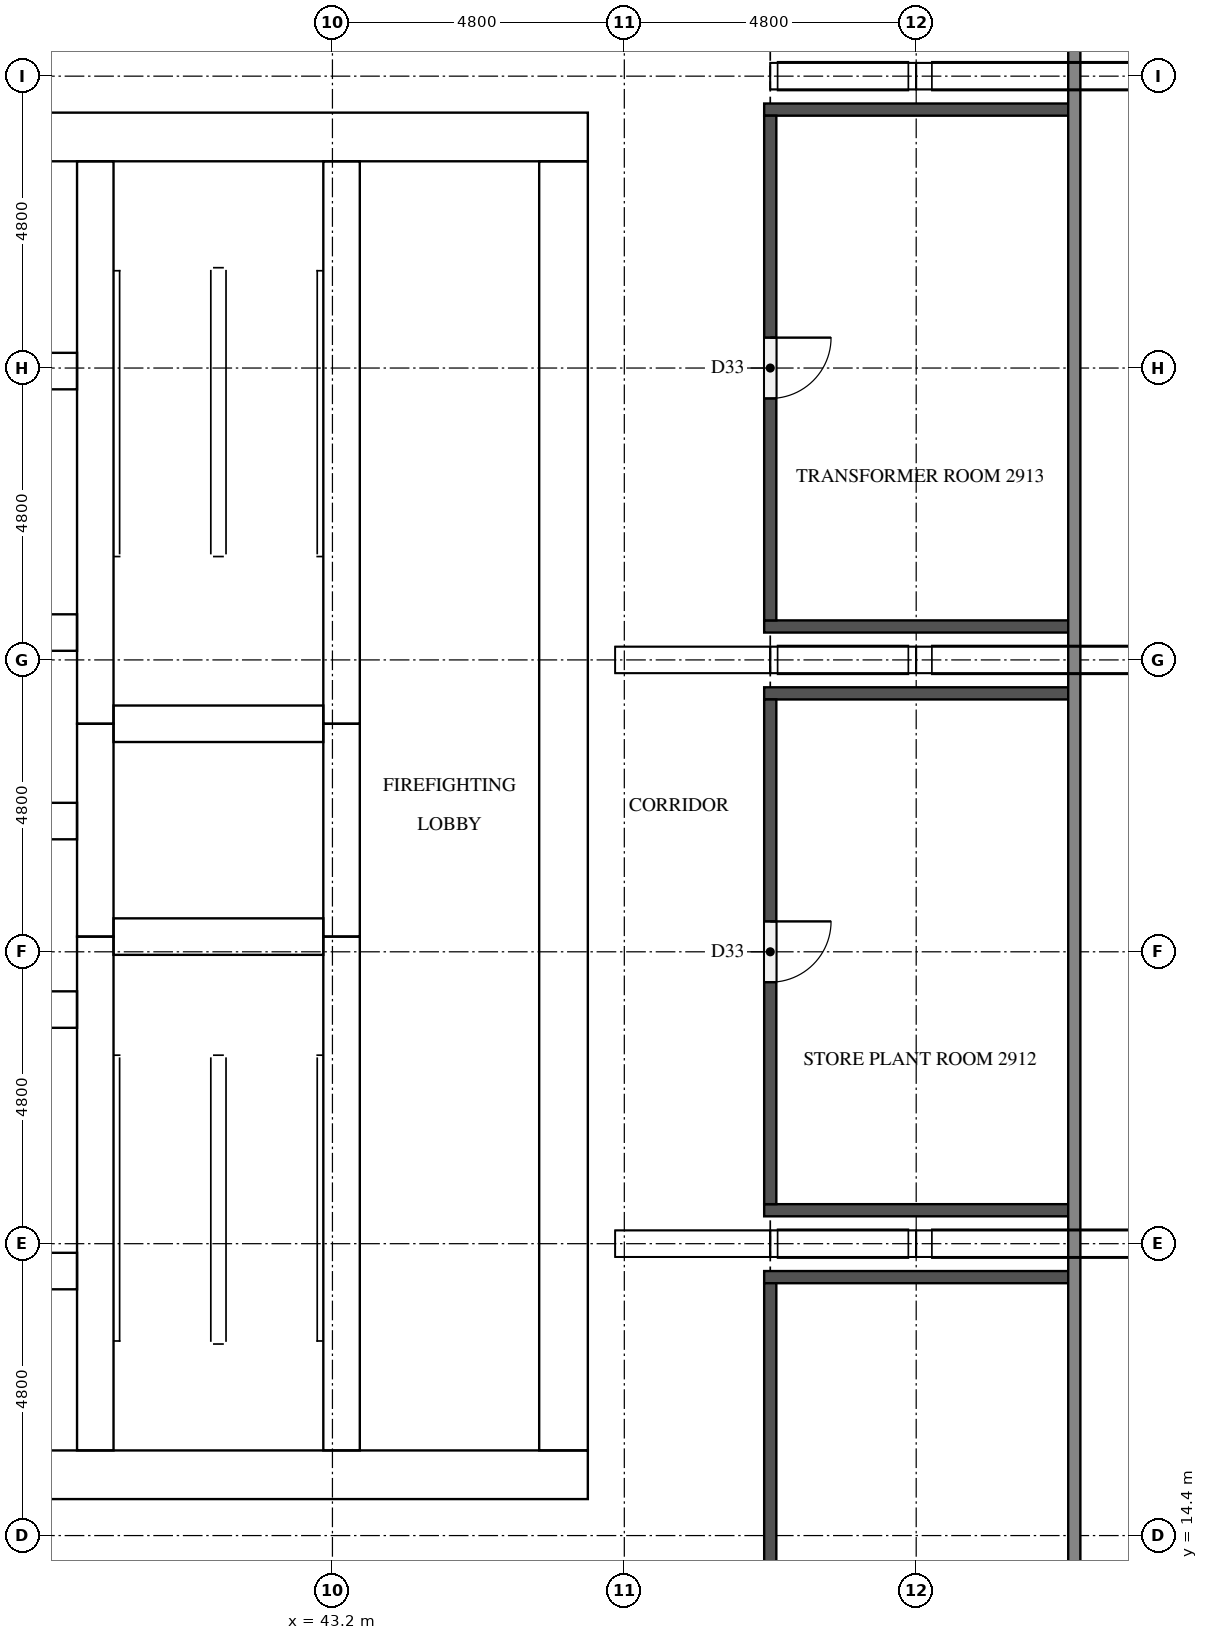
"""IFC4 building model, lengths in metres.
Left out: names, types, materials, properties, quantities, classifications, styles, units other than length and angle.
Written with IfcOpenShell. Run it as: python <this file> out.ifc"""

import sys

from ifc_helpers import new_model, si_unit, direction, frame, frame_2d, origin, place, context, subcontext, project, spatial, rectangle, extrude, element, fill, save


model = new_model("IFC4")
c1 = context("Model", 3, precision=1e-05, world=origin(), true_north=direction((0.0, 1.0)))
c2 = subcontext(c1, "Body", "Model", "MODEL_VIEW")
j1 = project(units=[si_unit("LENGTHUNIT", "METRE"), si_unit("PLANEANGLEUNIT", "RADIAN")], contexts=[c1])
p1 = place(None, origin())
s1 = spatial("IfcSite", under=j1, at=p1, CompositionType="ELEMENT")
p2 = place(p1, origin())
s2 = spatial("IfcBuilding", under=s1, at=p2, CompositionType="ELEMENT")
p3 = place(p2, frame((0.0, 0.0, 113.7)))
s3 = spatial("IfcBuildingStorey", under=s2, at=p3, CompositionType="ELEMENT", Elevation=113.7)
p4 = place(p3, frame((15.0, 15.4, 0.0), z_axis=(0.0, 0.0, 1.0), x_axis=(1.0, 0.0, 0.0)))
e1 = element("IfcWall", 1, at=p4, inside=s3, PredefinedType="SHEAR", context=c2, shape_type="SweptSolid", body=[
    extrude(rectangle(XDim=32.4, YDim=0.8, at=frame_2d((16.2, 0.0))), origin(), (0.0, 0.0, 1.0), 5.1),
])
p5 = place(p4, frame((15.3, 0.0, 0.0)))
e2 = element("IfcOpeningElement", 2, at=p5, cuts=e1, PredefinedType="OPENING", context=c2, shape_type="SweptSolid", body=[
    extrude(rectangle(XDim=1.8, YDim=2.1, at=frame_2d((0.9, 1.05))), frame((0.0, 0.41, 0.0), z_axis=(0.0, -1.0, 0.0), x_axis=(1.0, 0.0, 0.0)), (0.0, 0.0, 1.0), 0.82),
])
p6 = place(p3, frame((15.0, 37.4, 0.0), z_axis=(0.0, 0.0, 1.0), x_axis=(1.0, 0.0, 0.0)))
e3 = element("IfcWall", 3, at=p6, inside=s3, PredefinedType="SHEAR", context=c2, shape_type="SweptSolid", body=[
    extrude(rectangle(XDim=32.4, YDim=0.8, at=frame_2d((16.2, 0.0))), origin(), (0.0, 0.0, 1.0), 5.1),
])
p7 = place(p6, frame((15.3, 0.0, 0.0)))
e4 = element("IfcOpeningElement", 4, at=p7, cuts=e3, PredefinedType="OPENING", context=c2, shape_type="SweptSolid", body=[
    extrude(rectangle(XDim=1.8, YDim=2.1, at=frame_2d((0.9, 1.05))), frame((0.0, 0.41, 0.0), z_axis=(0.0, -1.0, 0.0), x_axis=(1.0, 0.0, 0.0)), (0.0, 0.0, 1.0), 0.82),
])
p8 = place(p6, frame((1.51, 0.0, 0.0)))
e5 = element("IfcOpeningElement", 5, at=p8, cuts=e3, PredefinedType="OPENING", context=c2, shape_type="SweptSolid", body=[
    extrude(rectangle(XDim=1.0, YDim=2.1, at=frame_2d((0.5, 1.05))), frame((0.0, 0.41, 0.0), z_axis=(0.0, -1.0, 0.0), x_axis=(1.0, 0.0, 0.0)), (0.0, 0.0, 1.0), 0.82),
])
p9 = place(p6, frame((5.11, 0.0, 0.0)))
e6 = element("IfcOpeningElement", 6, at=p9, cuts=e3, PredefinedType="OPENING", context=c2, shape_type="SweptSolid", body=[
    extrude(rectangle(XDim=1.0, YDim=2.1, at=frame_2d((0.5, 1.05))), frame((0.0, 0.41, 0.0), z_axis=(0.0, -1.0, 0.0), x_axis=(1.0, 0.0, 0.0)), (0.0, 0.0, 1.0), 0.82),
])
p10 = place(p3, frame((47.0, 15.8, 0.0), z_axis=(0.0, 0.0, 1.0), x_axis=(0.0, 1.0, 0.0)))
e7 = element("IfcWall", 7, at=p10, inside=s3, PredefinedType="SHEAR", context=c2, shape_type="SweptSolid", body=[
    extrude(rectangle(XDim=21.2, YDim=0.8, at=frame_2d((10.6, 0.0))), origin(), (0.0, 0.0, 1.0), 5.1),
])
p11 = place(p10, frame((10.3, 0.0, 0.0)))
e8 = element("IfcOpeningElement", 8, at=p11, cuts=e7, PredefinedType="OPENING", context=c2, shape_type="SweptSolid", body=[
    extrude(rectangle(XDim=1.2, YDim=2.1, at=frame_2d((0.6, 1.05))), frame((0.0, 0.41, 0.0), z_axis=(0.0, -1.0, 0.0), x_axis=(1.0, 0.0, 0.0)), (0.0, 0.0, 1.0), 0.82),
])
p12 = place(p3, frame((39.3, 15.8, 0.0), z_axis=(0.0, 0.0, 1.0), x_axis=(0.0, 1.0, 0.0)))
e9 = element("IfcWall", 9, at=p12, inside=s3, PredefinedType="SHEAR", context=c2, shape_type="SweptSolid", body=[
    extrude(rectangle(XDim=8.45, YDim=0.6, at=frame_2d((4.225, 0.0))), origin(), (0.0, 0.0, 1.0), 5.1),
])
p13 = place(p3, frame((39.3, 24.25, 0.0), z_axis=(0.0, 0.0, 1.0), x_axis=(0.0, 1.0, 0.0)))
e10 = element("IfcWall", 10, at=p13, inside=s3, PredefinedType="SHEAR", context=c2, shape_type="SweptSolid", body=[
    extrude(rectangle(XDim=3.5, YDim=0.6, at=frame_2d((1.75, 0.0))), origin(), (0.0, 0.0, 1.0), 5.1),
])
p14 = place(p3, frame((39.3, 27.75, 0.0), z_axis=(0.0, 0.0, 1.0), x_axis=(0.0, 1.0, 0.0)))
e11 = element("IfcWall", 11, at=p14, inside=s3, PredefinedType="SHEAR", context=c2, shape_type="SweptSolid", body=[
    extrude(rectangle(XDim=9.25, YDim=0.6, at=frame_2d((4.625, 0.0))), origin(), (0.0, 0.0, 1.0), 5.1),
])
p15 = place(p3, frame((43.35, 15.8, 0.0), z_axis=(0.0, 0.0, 1.0), x_axis=(0.0, 1.0, 0.0)))
e12 = element("IfcWall", 12, at=p15, inside=s3, PredefinedType="SHEAR", context=c2, shape_type="SweptSolid", body=[
    extrude(rectangle(XDim=8.45, YDim=0.6, at=frame_2d((4.225, 0.0))), origin(), (0.0, 0.0, 1.0), 5.1),
])
p16 = place(p15, frame((0.4, 0.0, 0.0)))
e13 = element("IfcOpeningElement", 13, at=p16, cuts=e12, PredefinedType="OPENING", context=c2, shape_type="SweptSolid", body=[
    extrude(rectangle(XDim=1.2, YDim=2.1, at=frame_2d((0.6, 1.05))), frame((0.0, 0.31, 0.0), z_axis=(0.0, -1.0, 0.0), x_axis=(1.0, 0.0, 0.0)), (0.0, 0.0, 1.0), 0.62),
])
p17 = place(p3, frame((43.35, 24.25, 0.0), z_axis=(0.0, 0.0, 1.0), x_axis=(0.0, 1.0, 0.0)))
e14 = element("IfcWall", 14, at=p17, inside=s3, PredefinedType="SHEAR", context=c2, shape_type="SweptSolid", body=[
    extrude(rectangle(XDim=3.5, YDim=0.6, at=frame_2d((1.75, 0.0))), origin(), (0.0, 0.0, 1.0), 5.1),
])
p18 = place(p17, frame((1.2, 0.0, 0.0)))
e15 = element("IfcOpeningElement", 15, at=p18, cuts=e14, PredefinedType="OPENING", context=c2, shape_type="SweptSolid", body=[
    extrude(rectangle(XDim=1.1, YDim=2.1, at=frame_2d((0.55, 1.05))), frame((0.0, 0.31, 0.0), z_axis=(0.0, -1.0, 0.0), x_axis=(1.0, 0.0, 0.0)), (0.0, 0.0, 1.0), 0.62),
])
p19 = place(p3, frame((43.35, 27.75, 0.0), z_axis=(0.0, 0.0, 1.0), x_axis=(0.0, 1.0, 0.0)))
e16 = element("IfcWall", 16, at=p19, inside=s3, PredefinedType="SHEAR", context=c2, shape_type="SweptSolid", body=[
    extrude(rectangle(XDim=9.25, YDim=0.6, at=frame_2d((4.625, 0.0))), origin(), (0.0, 0.0, 1.0), 5.1),
])
p20 = place(p19, frame((7.65, 0.0, 0.0)))
e17 = element("IfcOpeningElement", 17, at=p20, cuts=e16, PredefinedType="OPENING", context=c2, shape_type="SweptSolid", body=[
    extrude(rectangle(XDim=1.2, YDim=2.1, at=frame_2d((0.6, 1.05))), frame((0.0, 0.31, 0.0), z_axis=(0.0, -1.0, 0.0), x_axis=(1.0, 0.0, 0.0)), (0.0, 0.0, 1.0), 0.62),
])
for number, where, z_axis, x_axis in (
    (18, (39.6, 24.25, 0.0), (0.0, 0.0, 1.0), (1.0, 0.0, 0.0)),
    (19, (39.6, 27.75, 0.0), (0.0, 0.0, 1.0), (1.0, 0.0, 0.0)),
):
    element("IfcWall", number, at=place(p3, frame(where, z_axis=z_axis, x_axis=x_axis)), inside=s3, PredefinedType="SHEAR", context=c2, shape_type="SweptSolid", body=[
        extrude(rectangle(XDim=3.45, YDim=0.6, at=frame_2d((1.725, 0.0))), origin(), (0.0, 0.0, 1.0), 5.1),
    ])
p21 = place(p3, frame((33.4, 18.75, 0.0), z_axis=(0.0, 0.0, 1.0), x_axis=(1.0, 0.0, 0.0)))
e20 = element("IfcWall", 20, at=p21, inside=s3, PredefinedType="SHEAR", context=c2, shape_type="SweptSolid", body=[
    extrude(rectangle(XDim=5.6, YDim=0.6, at=frame_2d((2.8, 0.0))), origin(), (0.0, 0.0, 1.0), 5.1),
])
p22 = place(p21, frame((1.25, 0.0, 0.0)))
e21 = element("IfcOpeningElement", 21, at=p22, cuts=e20, PredefinedType="OPENING", context=c2, shape_type="SweptSolid", body=[
    extrude(rectangle(XDim=1.1, YDim=2.1, at=frame_2d((0.55, 1.05))), frame((0.0, 0.31, 0.0), z_axis=(0.0, -1.0, 0.0), x_axis=(1.0, 0.0, 0.0)), (0.0, 0.0, 1.0), 0.62),
])
p23 = place(p21, frame((3.85, 0.0, 0.0)))
e22 = element("IfcOpeningElement", 22, at=p23, cuts=e20, PredefinedType="OPENING", context=c2, shape_type="SweptSolid", body=[
    extrude(rectangle(XDim=1.1, YDim=2.1, at=frame_2d((0.55, 1.05))), frame((0.0, 0.31, 0.0), z_axis=(0.0, -1.0, 0.0), x_axis=(1.0, 0.0, 0.0)), (0.0, 0.0, 1.0), 0.62),
])
p24 = place(p3, frame((23.4, 23.05, 0.0), z_axis=(0.0, 0.0, 1.0), x_axis=(1.0, 0.0, 0.0)))
e23 = element("IfcWall", 23, at=p24, inside=s3, PredefinedType="SHEAR", context=c2, shape_type="SweptSolid", body=[
    extrude(rectangle(XDim=15.6, YDim=0.6, at=frame_2d((7.8, 0.0))), origin(), (0.0, 0.0, 1.0), 5.1),
])
p25 = place(p24, frame((2.033, 0.0, 0.0)))
e24 = element("IfcOpeningElement", 24, at=p25, cuts=e23, PredefinedType="OPENING", context=c2, shape_type="SweptSolid", body=[
    extrude(rectangle(XDim=1.0, YDim=2.1, at=frame_2d((0.5, 1.05))), frame((0.0, 0.31, 0.0), z_axis=(0.0, -1.0, 0.0), x_axis=(1.0, 0.0, 0.0)), (0.0, 0.0, 1.0), 0.62),
])
p26 = place(p24, frame((11.706, 0.0, 0.0)))
e25 = element("IfcOpeningElement", 25, at=p26, cuts=e23, PredefinedType="OPENING", context=c2, shape_type="SweptSolid", body=[
    extrude(rectangle(XDim=1.0, YDim=2.1, at=frame_2d((0.5, 1.05))), frame((0.0, 0.31, 0.0), z_axis=(0.0, -1.0, 0.0), x_axis=(1.0, 0.0, 0.0)), (0.0, 0.0, 1.0), 0.62),
])
p27 = place(p24, frame((14.339, 0.0, 0.0)))
e26 = element("IfcOpeningElement", 26, at=p27, cuts=e23, PredefinedType="OPENING", context=c2, shape_type="SweptSolid", body=[
    extrude(rectangle(XDim=1.0, YDim=2.1, at=frame_2d((0.5, 1.05))), frame((0.0, 0.31, 0.0), z_axis=(0.0, -1.0, 0.0), x_axis=(1.0, 0.0, 0.0)), (0.0, 0.0, 1.0), 0.62),
])
p28 = place(p3, frame((23.4, 26.15, 0.0), z_axis=(0.0, 0.0, 1.0), x_axis=(1.0, 0.0, 0.0)))
e27 = element("IfcWall", 27, at=p28, inside=s3, PredefinedType="SHEAR", context=c2, shape_type="SweptSolid", body=[
    extrude(rectangle(XDim=15.6, YDim=0.6, at=frame_2d((7.8, 0.0))), origin(), (0.0, 0.0, 1.0), 5.1),
])
p29 = place(p3, frame((23.4, 29.25, 0.0), z_axis=(0.0, 0.0, 1.0), x_axis=(1.0, 0.0, 0.0)))
e28 = element("IfcWall", 28, at=p29, inside=s3, PredefinedType="SHEAR", context=c2, shape_type="SweptSolid", body=[
    extrude(rectangle(XDim=15.6, YDim=0.6, at=frame_2d((7.8, 0.0))), origin(), (0.0, 0.0, 1.0), 5.1),
])
p30 = place(p29, frame((1.166, 0.0, 0.0)))
e29 = element("IfcOpeningElement", 29, at=p30, cuts=e28, PredefinedType="OPENING", context=c2, shape_type="SweptSolid", body=[
    extrude(rectangle(XDim=1.0, YDim=2.1, at=frame_2d((0.5, 1.05))), frame((0.0, 0.31, 0.0), z_axis=(0.0, -1.0, 0.0), x_axis=(1.0, 0.0, 0.0)), (0.0, 0.0, 1.0), 0.62),
])
p31 = place(p29, frame((5.35, 0.0, 0.0)))
e30 = element("IfcOpeningElement", 30, at=p31, cuts=e28, PredefinedType="OPENING", context=c2, shape_type="SweptSolid", body=[
    extrude(rectangle(XDim=1.0, YDim=2.1, at=frame_2d((0.5, 1.05))), frame((0.0, 0.31, 0.0), z_axis=(0.0, -1.0, 0.0), x_axis=(1.0, 0.0, 0.0)), (0.0, 0.0, 1.0), 0.62),
])
p32 = place(p29, frame((9.016, 0.0, 0.0)))
e31 = element("IfcOpeningElement", 31, at=p32, cuts=e28, PredefinedType="OPENING", context=c2, shape_type="SweptSolid", body=[
    extrude(rectangle(XDim=1.0, YDim=2.1, at=frame_2d((0.5, 1.05))), frame((0.0, 0.31, 0.0), z_axis=(0.0, -1.0, 0.0), x_axis=(1.0, 0.0, 0.0)), (0.0, 0.0, 1.0), 0.62),
])
p33 = place(p29, frame((12.732, 0.0, 0.0)))
e32 = element("IfcOpeningElement", 32, at=p33, cuts=e28, PredefinedType="OPENING", context=c2, shape_type="SweptSolid", body=[
    extrude(rectangle(XDim=1.0, YDim=2.1, at=frame_2d((0.5, 1.05))), frame((0.0, 0.31, 0.0), z_axis=(0.0, -1.0, 0.0), x_axis=(1.0, 0.0, 0.0)), (0.0, 0.0, 1.0), 0.62),
])
p34 = place(p3, frame((33.4, 33.55, 0.0), z_axis=(0.0, 0.0, 1.0), x_axis=(1.0, 0.0, 0.0)))
e33 = element("IfcWall", 33, at=p34, inside=s3, PredefinedType="SHEAR", context=c2, shape_type="SweptSolid", body=[
    extrude(rectangle(XDim=5.6, YDim=0.6, at=frame_2d((2.8, 0.0))), origin(), (0.0, 0.0, 1.0), 5.1),
])
for number, where, z_axis, x_axis in (
    (34, (50.3, 18.65, 0.0), (0.0, 0.0, 1.0), (1.0, 0.0, 0.0)),
    (35, (50.3, 19.75, 0.0), (0.0, 0.0, 1.0), (1.0, 0.0, 0.0)),
    (36, (50.3, 28.25, 0.0), (0.0, 0.0, 1.0), (1.0, 0.0, 0.0)),
    (37, (50.3, 29.35, 0.0), (0.0, 0.0, 1.0), (1.0, 0.0, 0.0)),
    (38, (50.3, 37.85, 0.0), (0.0, 0.0, 1.0), (1.0, 0.0, 0.0)),
):
    element("IfcWall", number, at=place(p3, frame(where, z_axis=z_axis, x_axis=x_axis)), inside=s3, PredefinedType="PARTITIONING", context=c2, shape_type="SweptSolid", body=[
        extrude(rectangle(XDim=5.0, YDim=0.2, at=frame_2d((2.5, 0.0))), origin(), (0.0, 0.0, 1.0), 5.1),
    ])
p35 = place(p3, frame((50.4, 12.1, 0.0), z_axis=(0.0, 0.0, 1.0), x_axis=(0.0, 1.0, 0.0)))
e39 = element("IfcWall", 39, at=p35, inside=s3, PredefinedType="PARTITIONING", context=c2, shape_type="SweptSolid", body=[
    extrude(rectangle(XDim=6.45, YDim=0.2, at=frame_2d((3.225, 0.0))), origin(), (0.0, 0.0, 1.0), 5.1),
])
p36 = place(p3, frame((50.4, 28.15, 0.0), z_axis=(0.0, 0.0, 1.0), x_axis=(0.0, -1.0, 0.0)))
e40 = element("IfcWall", 40, at=p36, inside=s3, PredefinedType="PARTITIONING", context=c2, shape_type="SweptSolid", body=[
    extrude(rectangle(XDim=8.3, YDim=0.2, at=frame_2d((4.15, 0.0))), origin(), (0.0, 0.0, 1.0), 5.1),
])
p37 = place(p36, frame((3.65, 0.0, 0.0)))
e41 = element("IfcOpeningElement", 41, at=p37, cuts=e40, PredefinedType="OPENING", context=c2, shape_type="SweptSolid", body=[
    extrude(rectangle(XDim=1.0, YDim=2.1, at=frame_2d((0.5, 1.05))), frame((0.0, 0.11, 0.0), z_axis=(0.0, -1.0, 0.0), x_axis=(1.0, 0.0, 0.0)), (0.0, 0.0, 1.0), 0.22),
])
p38 = place(p3, frame((50.4, 37.75, 0.0), z_axis=(0.0, 0.0, 1.0), x_axis=(0.0, -1.0, 0.0)))
e42 = element("IfcWall", 42, at=p38, inside=s3, PredefinedType="PARTITIONING", context=c2, shape_type="SweptSolid", body=[
    extrude(rectangle(XDim=8.3, YDim=0.2, at=frame_2d((4.15, 0.0))), origin(), (0.0, 0.0, 1.0), 5.1),
])
p39 = place(p38, frame((3.65, 0.0, 0.0)))
e43 = element("IfcOpeningElement", 43, at=p39, cuts=e42, PredefinedType="OPENING", context=c2, shape_type="SweptSolid", body=[
    extrude(rectangle(XDim=1.0, YDim=2.1, at=frame_2d((0.5, 1.05))), frame((0.0, 0.11, 0.0), z_axis=(0.0, -1.0, 0.0), x_axis=(1.0, 0.0, 0.0)), (0.0, 0.0, 1.0), 0.22),
])
p40 = place(p18, origin())
e44 = element("IfcDoor", 44, at=p40, inside=s3, OperationType="DOUBLE_DOOR_SLIDING", PredefinedType="DOOR", context=c2, shape_type="SweptSolid", body=[
    extrude(rectangle(XDim=1.1, YDim=2.1, at=frame_2d((0.55, 1.05))), frame((0.0, 0.025, 0.0), z_axis=(0.0, -1.0, 0.0), x_axis=(1.0, 0.0, 0.0)), (0.0, 0.0, 1.0), 0.05),
])
fill(e15, e44)
p41 = place(p16, origin())
e45 = element("IfcDoor", 45, at=p41, inside=s3, OperationType="SINGLE_SWING_RIGHT", PredefinedType="DOOR", context=c2, shape_type="SweptSolid", body=[
    extrude(rectangle(XDim=1.2, YDim=2.1, at=frame_2d((0.6, 1.05))), frame((0.0, 0.025, 0.0), z_axis=(0.0, -1.0, 0.0), x_axis=(1.0, 0.0, 0.0)), (0.0, 0.0, 1.0), 0.05),
])
fill(e13, e45)
p42 = place(p20, origin())
e46 = element("IfcDoor", 46, at=p42, inside=s3, OperationType="SINGLE_SWING_LEFT", PredefinedType="DOOR", context=c2, shape_type="SweptSolid", body=[
    extrude(rectangle(XDim=1.2, YDim=2.1, at=frame_2d((0.6, 1.05))), frame((0.0, 0.025, 0.0), z_axis=(0.0, -1.0, 0.0), x_axis=(1.0, 0.0, 0.0)), (0.0, 0.0, 1.0), 0.05),
])
fill(e17, e46)
p43 = place(p11, origin())
e47 = element("IfcDoor", 47, at=p43, inside=s3, OperationType="SINGLE_SWING_LEFT", PredefinedType="DOOR", context=c2, shape_type="SweptSolid", body=[
    extrude(rectangle(XDim=1.2, YDim=2.1, at=frame_2d((0.6, 1.05))), frame((0.0, 0.025, 0.0), z_axis=(0.0, -1.0, 0.0), x_axis=(1.0, 0.0, 0.0)), (0.0, 0.0, 1.0), 0.05),
])
fill(e8, e47)
p44 = place(p27, frame((1.0, 0.0, 0.0), z_axis=(0.0, 0.0, 1.0), x_axis=(-1.0, 0.0, 0.0)))
e48 = element("IfcDoor", 48, at=p44, inside=s3, OperationType="SINGLE_SWING_RIGHT", PredefinedType="DOOR", context=c2, shape_type="SweptSolid", body=[
    extrude(rectangle(XDim=1.0, YDim=2.1, at=frame_2d((0.5, 1.05))), frame((0.0, 0.025, 0.0), z_axis=(0.0, -1.0, 0.0), x_axis=(1.0, 0.0, 0.0)), (0.0, 0.0, 1.0), 0.05),
])
fill(e26, e48)
p45 = place(p37, origin())
e49 = element("IfcDoor", 49, at=p45, inside=s3, OperationType="SINGLE_SWING_LEFT", PredefinedType="DOOR", context=c2, shape_type="SweptSolid", body=[
    extrude(rectangle(XDim=1.0, YDim=2.1, at=frame_2d((0.5, 1.05))), frame((0.0, 0.025, 0.0), z_axis=(0.0, -1.0, 0.0), x_axis=(1.0, 0.0, 0.0)), (0.0, 0.0, 1.0), 0.05),
])
fill(e41, e49)
p46 = place(p39, origin())
e50 = element("IfcDoor", 50, at=p46, inside=s3, OperationType="SINGLE_SWING_LEFT", PredefinedType="DOOR", context=c2, shape_type="SweptSolid", body=[
    extrude(rectangle(XDim=1.0, YDim=2.1, at=frame_2d((0.5, 1.05))), frame((0.0, 0.025, 0.0), z_axis=(0.0, -1.0, 0.0), x_axis=(1.0, 0.0, 0.0)), (0.0, 0.0, 1.0), 0.05),
])
fill(e43, e50)
save(model, sys.argv[1])
